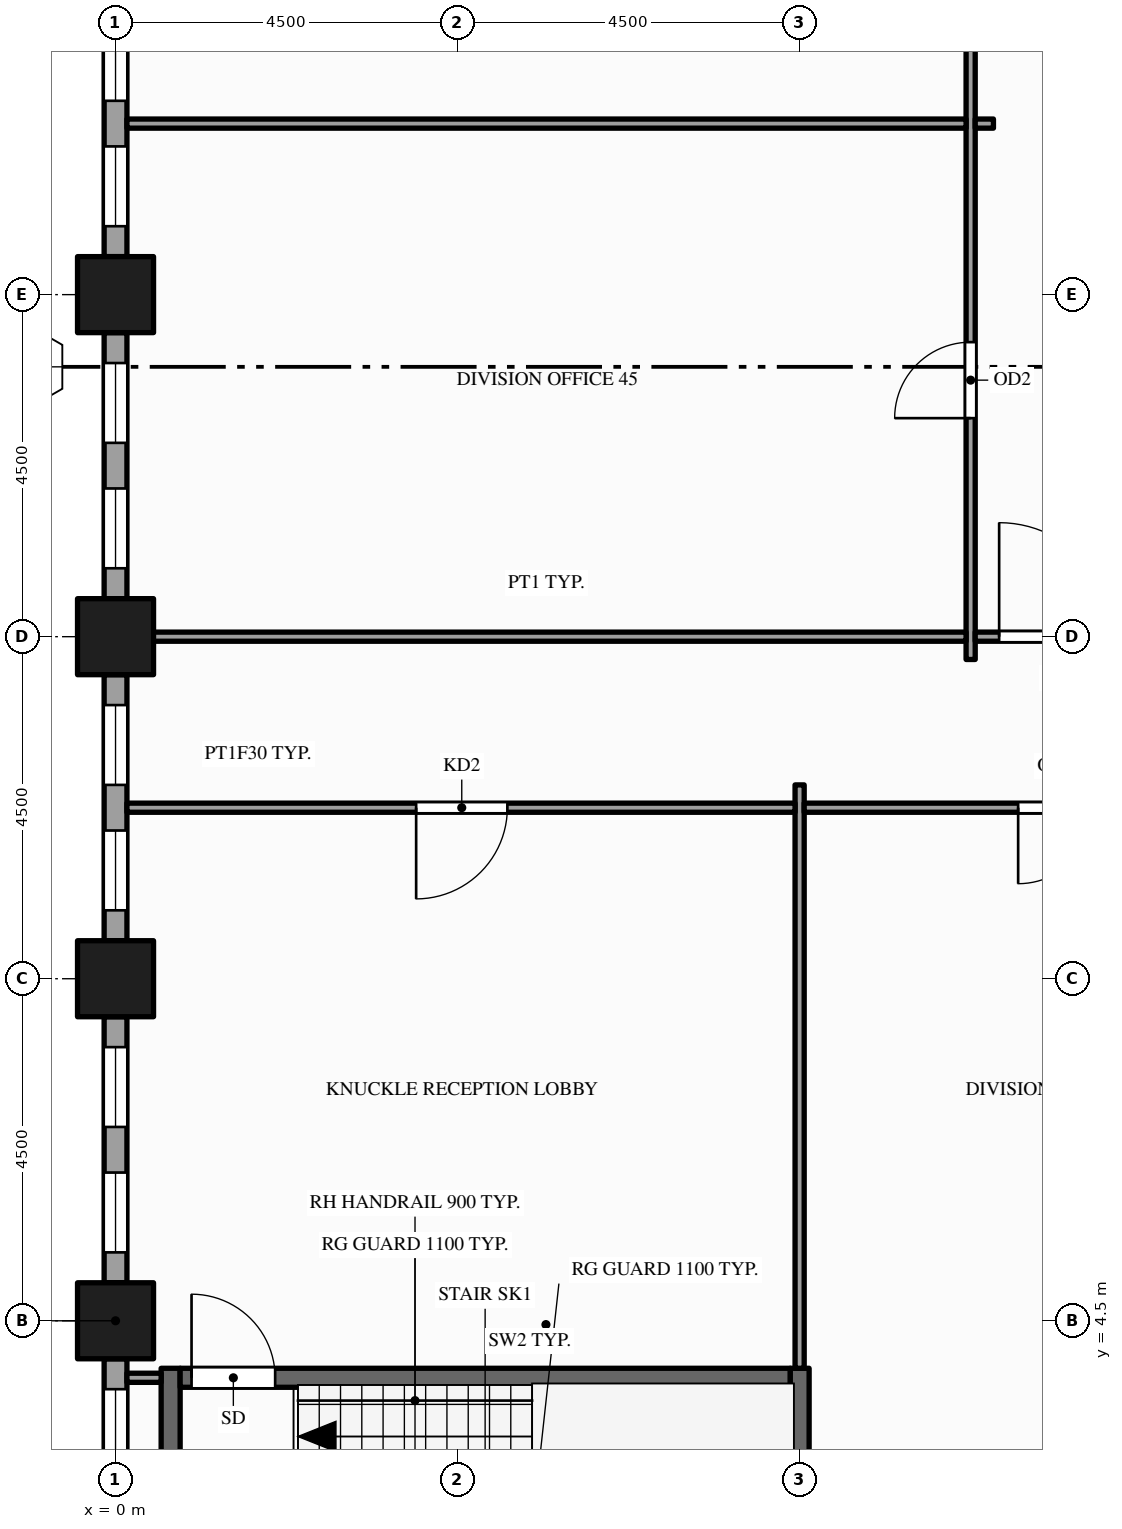
"""IFC4 building model, lengths in metres.
Left out: names, types, materials, properties, quantities, classifications, styles, units other than length and angle.
Written with IfcOpenShell. Run it as: python <this file> out.ifc"""

import sys

from ifc_helpers import new_model, si_unit, direction, frame, frame_2d, origin, origin_2d, place, context, subcontext, project, spatial, rectangle, hollow_rectangle, extrude, element, fill, save


model = new_model("IFC4")
c1 = context("Model", 3, precision=1e-05, world=origin(), true_north=direction((0.0, 1.0)))
c2 = subcontext(c1, "Body", "Model", "MODEL_VIEW")
j1 = project(units=[si_unit("LENGTHUNIT", "METRE"), si_unit("PLANEANGLEUNIT", "RADIAN")], contexts=[c1])
p1 = place(None, origin())
s1 = spatial("IfcSite", under=j1, at=p1, CompositionType="ELEMENT")
p2 = place(p1, origin())
s2 = spatial("IfcBuilding", under=s1, at=p2, CompositionType="ELEMENT")
p3 = place(p2, frame((0.0, 0.0, 83.0)))
s3 = spatial("IfcBuildingStorey", under=s2, at=p3, CompositionType="ELEMENT", Elevation=83.0)
for number, where, z_axis, x_axis in (
    (1, (0.0, 4.5, -0.15), (0.0, 0.0, 1.0), (1.0, 0.0, 0.0)),
    (2, (0.0, 9.0, -0.15), (0.0, 0.0, 1.0), (1.0, 0.0, 0.0)),
    (3, (0.0, 13.5, -0.15), (0.0, 0.0, 1.0), (1.0, 0.0, 0.0)),
    (4, (0.0, 18.0, -0.15), (0.0, 0.0, 1.0), (1.0, 0.0, 0.0)),
):
    element("IfcColumn", number, at=place(p3, frame(where, z_axis=z_axis, x_axis=x_axis)), inside=s3, PredefinedType="COLUMN", context=c2, shape_type="SweptSolid", body=[
        extrude(hollow_rectangle(XDim=1.0, YDim=1.0, WallThickness=0.05, at=origin_2d()), origin(), (0.0, 0.0, 1.0), 4.0),
    ])
p4 = place(p3, frame((0.0, 22.0, 0.0), z_axis=(0.0, 0.0, 1.0), x_axis=(0.0, -1.0, 0.0)))
e5 = element("IfcWall", 5, at=p4, inside=s3, PredefinedType="STANDARD", context=c2, shape_type="SweptSolid", body=[
    extrude(rectangle(XDim=3.5, YDim=0.3, at=frame_2d((1.75, 0.0))), origin(), (0.0, 0.0, 1.0), 3.154),
])
p5 = place(p4, frame((0.4, 0.0, 0.9)))
e6 = element("IfcOpeningElement", 6, at=p5, cuts=e5, PredefinedType="OPENING", context=c2, shape_type="SweptSolid", body=[
    extrude(rectangle(XDim=1.05, YDim=2.0, at=frame_2d((0.525, 1.0))), frame((0.0, 0.16, 0.0), z_axis=(0.0, -1.0, 0.0), x_axis=(1.0, 0.0, 0.0)), (0.0, 0.0, 1.0), 0.32),
])
p6 = place(p4, frame((2.05, 0.0, 0.9)))
e7 = element("IfcOpeningElement", 7, at=p6, cuts=e5, PredefinedType="OPENING", context=c2, shape_type="SweptSolid", body=[
    extrude(rectangle(XDim=1.05, YDim=2.0, at=frame_2d((0.525, 1.0))), frame((0.0, 0.16, 0.0), z_axis=(0.0, -1.0, 0.0), x_axis=(1.0, 0.0, 0.0)), (0.0, 0.0, 1.0), 0.32),
])
p7 = place(p3, frame((0.0, 17.5, 0.0), z_axis=(0.0, 0.0, 1.0), x_axis=(0.0, -1.0, 0.0)))
e8 = element("IfcWall", 8, at=p7, inside=s3, PredefinedType="STANDARD", context=c2, shape_type="SweptSolid", body=[
    extrude(rectangle(XDim=3.5, YDim=0.3, at=frame_2d((1.75, 0.0))), origin(), (0.0, 0.0, 1.0), 3.154),
])
p8 = place(p7, frame((0.4, 0.0, 0.9)))
e9 = element("IfcOpeningElement", 9, at=p8, cuts=e8, PredefinedType="OPENING", context=c2, shape_type="SweptSolid", body=[
    extrude(rectangle(XDim=1.05, YDim=2.0, at=frame_2d((0.525, 1.0))), frame((0.0, 0.16, 0.0), z_axis=(0.0, -1.0, 0.0), x_axis=(1.0, 0.0, 0.0)), (0.0, 0.0, 1.0), 0.32),
])
p9 = place(p7, frame((2.05, 0.0, 0.9)))
e10 = element("IfcOpeningElement", 10, at=p9, cuts=e8, PredefinedType="OPENING", context=c2, shape_type="SweptSolid", body=[
    extrude(rectangle(XDim=1.05, YDim=2.0, at=frame_2d((0.525, 1.0))), frame((0.0, 0.16, 0.0), z_axis=(0.0, -1.0, 0.0), x_axis=(1.0, 0.0, 0.0)), (0.0, 0.0, 1.0), 0.32),
])
p10 = place(p3, frame((0.0, 13.0, 0.0), z_axis=(0.0, 0.0, 1.0), x_axis=(0.0, -1.0, 0.0)))
e11 = element("IfcWall", 11, at=p10, inside=s3, PredefinedType="STANDARD", context=c2, shape_type="SweptSolid", body=[
    extrude(rectangle(XDim=3.5, YDim=0.3, at=frame_2d((1.75, 0.0))), origin(), (0.0, 0.0, 1.0), 3.154),
])
p11 = place(p10, frame((0.4, 0.0, 0.9)))
e12 = element("IfcOpeningElement", 12, at=p11, cuts=e11, PredefinedType="OPENING", context=c2, shape_type="SweptSolid", body=[
    extrude(rectangle(XDim=1.05, YDim=2.0, at=frame_2d((0.525, 1.0))), frame((0.0, 0.16, 0.0), z_axis=(0.0, -1.0, 0.0), x_axis=(1.0, 0.0, 0.0)), (0.0, 0.0, 1.0), 0.32),
])
p12 = place(p10, frame((2.05, 0.0, 0.9)))
e13 = element("IfcOpeningElement", 13, at=p12, cuts=e11, PredefinedType="OPENING", context=c2, shape_type="SweptSolid", body=[
    extrude(rectangle(XDim=1.05, YDim=2.0, at=frame_2d((0.525, 1.0))), frame((0.0, 0.16, 0.0), z_axis=(0.0, -1.0, 0.0), x_axis=(1.0, 0.0, 0.0)), (0.0, 0.0, 1.0), 0.32),
])
p13 = place(p3, frame((0.0, 8.5, 0.0), z_axis=(0.0, 0.0, 1.0), x_axis=(0.0, -1.0, 0.0)))
e14 = element("IfcWall", 14, at=p13, inside=s3, PredefinedType="STANDARD", context=c2, shape_type="SweptSolid", body=[
    extrude(rectangle(XDim=3.5, YDim=0.3, at=frame_2d((1.75, 0.0))), origin(), (0.0, 0.0, 1.0), 3.154),
])
p14 = place(p13, frame((0.4, 0.0, 0.9)))
e15 = element("IfcOpeningElement", 15, at=p14, cuts=e14, PredefinedType="OPENING", context=c2, shape_type="SweptSolid", body=[
    extrude(rectangle(XDim=1.05, YDim=2.0, at=frame_2d((0.525, 1.0))), frame((0.0, 0.16, 0.0), z_axis=(0.0, -1.0, 0.0), x_axis=(1.0, 0.0, 0.0)), (0.0, 0.0, 1.0), 0.32),
])
p15 = place(p13, frame((2.05, 0.0, 0.9)))
e16 = element("IfcOpeningElement", 16, at=p15, cuts=e14, PredefinedType="OPENING", context=c2, shape_type="SweptSolid", body=[
    extrude(rectangle(XDim=1.05, YDim=2.0, at=frame_2d((0.525, 1.0))), frame((0.0, 0.16, 0.0), z_axis=(0.0, -1.0, 0.0), x_axis=(1.0, 0.0, 0.0)), (0.0, 0.0, 1.0), 0.32),
])
p16 = place(p3, frame((0.0, 4.0, 0.0), z_axis=(0.0, 0.0, 1.0), x_axis=(0.0, -1.0, 0.0)))
e17 = element("IfcWall", 17, at=p16, inside=s3, PredefinedType="STANDARD", context=c2, shape_type="SweptSolid", body=[
    extrude(rectangle(XDim=3.5, YDim=0.3, at=frame_2d((1.75, 0.0))), origin(), (0.0, 0.0, 1.0), 3.154),
])
p17 = place(p16, frame((0.4, 0.0, 0.9)))
e18 = element("IfcOpeningElement", 18, at=p17, cuts=e17, PredefinedType="OPENING", context=c2, shape_type="SweptSolid", body=[
    extrude(rectangle(XDim=1.05, YDim=2.0, at=frame_2d((0.525, 1.0))), frame((0.0, 0.16, 0.0), z_axis=(0.0, -1.0, 0.0), x_axis=(1.0, 0.0, 0.0)), (0.0, 0.0, 1.0), 0.32),
])
p18 = place(p16, frame((2.05, 0.0, 0.9)))
e19 = element("IfcOpeningElement", 19, at=p18, cuts=e17, PredefinedType="OPENING", context=c2, shape_type="SweptSolid", body=[
    extrude(rectangle(XDim=1.05, YDim=2.0, at=frame_2d((0.525, 1.0))), frame((0.0, 0.16, 0.0), z_axis=(0.0, -1.0, 0.0), x_axis=(1.0, 0.0, 0.0)), (0.0, 0.0, 1.0), 0.32),
])
p19 = place(p3, frame((0.725, 0.6, 0.0), z_axis=(0.0, 0.0, 1.0), x_axis=(0.0, 1.0, 0.0)))
e20 = element("IfcWall", 20, at=p19, inside=s3, PredefinedType="SHEAR", context=c2, shape_type="SweptSolid", body=[
    extrude(rectangle(XDim=3.275, YDim=0.25, at=frame_2d((1.637, 0.0))), origin(), (0.0, 0.0, 1.0), 3.85),
])
p20 = place(p3, frame((9.0, 0.5, 0.0), z_axis=(0.0, 0.0, 1.0), x_axis=(0.0, 1.0, 0.0)))
e21 = element("IfcWall", 21, at=p20, inside=s3, PredefinedType="SHEAR", context=c2, shape_type="SweptSolid", body=[
    extrude(rectangle(XDim=3.375, YDim=0.25, at=frame_2d((1.688, 0.0))), origin(), (0.0, 0.0, 1.0), 3.85),
])
p21 = place(p3, frame((9.0, 3.875, 0.0), z_axis=(0.0, 0.0, 1.0), x_axis=(0.0, 1.0, 0.0)))
e22 = element("IfcWall", 22, at=p21, inside=s3, PredefinedType="PARTITIONING", context=c2, shape_type="SweptSolid", body=[
    extrude(rectangle(XDim=7.675, YDim=0.12, at=frame_2d((3.837, 0.0))), origin(), (0.0, 0.0, 1.0), 2.938),
])
p22 = place(p3, frame((11.25, 13.2, 0.0), z_axis=(0.0, 0.0, 1.0), x_axis=(0.0, 1.0, 0.0)))
e23 = element("IfcWall", 23, at=p22, inside=s3, PredefinedType="PARTITIONING", context=c2, shape_type="SweptSolid", body=[
    extrude(rectangle(XDim=18.6, YDim=0.12, at=frame_2d((9.3, 0.0))), origin(), (0.0, 0.0, 1.0), 2.6),
])
p23 = place(p22, frame((3.175, 0.0, 0.0)))
e24 = element("IfcOpeningElement", 24, at=p23, cuts=e23, PredefinedType="OPENING", context=c2, shape_type="SweptSolid", body=[
    extrude(rectangle(XDim=1.0, YDim=2.1, at=frame_2d((0.5, 1.05))), frame((0.0, 0.07, 0.0), z_axis=(0.0, -1.0, 0.0), x_axis=(1.0, 0.0, 0.0)), (0.0, 0.0, 1.0), 0.14),
])
p24 = place(p22, frame((9.855, 0.0, 0.0)))
e25 = element("IfcOpeningElement", 25, at=p24, cuts=e23, PredefinedType="OPENING", context=c2, shape_type="SweptSolid", body=[
    extrude(rectangle(XDim=1.2, YDim=2.1, at=frame_2d((0.6, 1.05))), frame((0.0, 0.07, 0.0), z_axis=(0.0, -1.0, 0.0), x_axis=(1.0, 0.0, 0.0)), (0.0, 0.0, 1.0), 0.14),
])
p25 = place(p3, frame((0.15, 3.75, 0.0), z_axis=(0.0, 0.0, 1.0), x_axis=(1.0, 0.0, 0.0)))
e26 = element("IfcWall", 26, at=p25, inside=s3, PredefinedType="PARTITIONING", context=c2, shape_type="SweptSolid", body=[
    extrude(rectangle(XDim=0.45, YDim=0.12, at=frame_2d((0.225, 0.0))), origin(), (0.0, 0.0, 1.0), 3.154),
])
p26 = place(p3, frame((0.85, 3.75, 0.0), z_axis=(0.0, 0.0, 1.0), x_axis=(1.0, 0.0, 0.0)))
e27 = element("IfcWall", 27, at=p26, inside=s3, PredefinedType="SHEAR", context=c2, shape_type="SweptSolid", body=[
    extrude(rectangle(XDim=8.025, YDim=0.25, at=frame_2d((4.012, 0.0))), origin(), (0.0, 0.0, 1.0), 3.85),
])
p27 = place(p26, frame((0.15, 0.0, 0.0)))
e28 = element("IfcOpeningElement", 28, at=p27, cuts=e27, PredefinedType="OPENING", context=c2, shape_type="SweptSolid", body=[
    extrude(rectangle(XDim=1.1, YDim=2.1, at=frame_2d((0.55, 1.05))), frame((0.0, 0.135, 0.0), z_axis=(0.0, -1.0, 0.0), x_axis=(1.0, 0.0, 0.0)), (0.0, 0.0, 1.0), 0.27),
])
p28 = place(p3, frame((0.15, 11.25, 0.0), z_axis=(0.0, 0.0, 1.0), x_axis=(1.0, 0.0, 0.0)))
e29 = element("IfcWall", 29, at=p28, inside=s3, PredefinedType="PARTITIONING", context=c2, shape_type="SweptSolid", body=[
    extrude(rectangle(XDim=8.79, YDim=0.12, at=frame_2d((4.395, 0.0))), origin(), (0.0, 0.0, 1.0), 2.938),
])
p29 = place(p28, frame((3.805, 0.0, 0.0)))
e30 = element("IfcOpeningElement", 30, at=p29, cuts=e29, PredefinedType="OPENING", context=c2, shape_type="SweptSolid", body=[
    extrude(rectangle(XDim=1.2, YDim=2.1, at=frame_2d((0.6, 1.05))), frame((0.0, 0.07, 0.0), z_axis=(0.0, -1.0, 0.0), x_axis=(1.0, 0.0, 0.0)), (0.0, 0.0, 1.0), 0.14),
])
p30 = place(p3, frame((9.06, 11.25, 0.0), z_axis=(0.0, 0.0, 1.0), x_axis=(1.0, 0.0, 0.0)))
e31 = element("IfcWall", 31, at=p30, inside=s3, PredefinedType="PARTITIONING", context=c2, shape_type="SweptSolid", body=[
    extrude(rectangle(XDim=6.63, YDim=0.12, at=frame_2d((3.315, 0.0))), origin(), (0.0, 0.0, 1.0), 2.938),
])
p31 = place(p30, frame((2.815, 0.0, 0.0)))
e32 = element("IfcOpeningElement", 32, at=p31, cuts=e31, PredefinedType="OPENING", context=c2, shape_type="SweptSolid", body=[
    extrude(rectangle(XDim=1.0, YDim=2.1, at=frame_2d((0.5, 1.05))), frame((0.0, 0.07, 0.0), z_axis=(0.0, -1.0, 0.0), x_axis=(1.0, 0.0, 0.0)), (0.0, 0.0, 1.0), 0.14),
])
p32 = place(p3, frame((0.15, 13.5, 0.0), z_axis=(0.0, 0.0, 1.0), x_axis=(1.0, 0.0, 0.0)))
e33 = element("IfcWall", 33, at=p32, inside=s3, PredefinedType="PARTITIONING", context=c2, shape_type="SweptSolid", body=[
    extrude(rectangle(XDim=11.04, YDim=0.12, at=frame_2d((5.52, 0.0))), origin(), (0.0, 0.0, 1.0), 2.938),
])
p33 = place(p3, frame((11.31, 13.5, 0.0), z_axis=(0.0, 0.0, 1.0), x_axis=(1.0, 0.0, 0.0)))
e34 = element("IfcWall", 34, at=p33, inside=s3, PredefinedType="PARTITIONING", context=c2, shape_type="SweptSolid", body=[
    extrude(rectangle(XDim=2.13, YDim=0.12, at=frame_2d((1.065, 0.0))), origin(), (0.0, 0.0, 1.0), 2.938),
])
p34 = place(p33, frame((0.315, 0.0, 0.0)))
e35 = element("IfcOpeningElement", 35, at=p34, cuts=e34, PredefinedType="OPENING", context=c2, shape_type="SweptSolid", body=[
    extrude(rectangle(XDim=1.5, YDim=2.1, at=frame_2d((0.75, 1.05))), frame((0.0, 0.07, 0.0), z_axis=(0.0, -1.0, 0.0), x_axis=(1.0, 0.0, 0.0)), (0.0, 0.0, 1.0), 0.14),
])
p35 = place(p3, frame((0.15, 20.25, 0.0), z_axis=(0.0, 0.0, 1.0), x_axis=(1.0, 0.0, 0.0)))
e36 = element("IfcWall", 36, at=p35, inside=s3, PredefinedType="PARTITIONING", context=c2, shape_type="SweptSolid", body=[
    extrude(rectangle(XDim=11.04, YDim=0.12, at=frame_2d((5.52, 0.0))), origin(), (0.0, 0.0, 1.0), 2.938),
])
p36 = place(p3, frame((11.31, 20.25, 0.0), z_axis=(0.0, 0.0, 1.0), x_axis=(1.0, 0.0, 0.0)))
e37 = element("IfcWall", 37, at=p36, inside=s3, PredefinedType="PARTITIONING", context=c2, shape_type="SweptSolid", body=[
    extrude(rectangle(XDim=0.24, YDim=0.12, at=frame_2d((0.12, 0.0))), origin(), (0.0, 0.0, 1.0), 2.938),
])
p37 = place(p5, origin())
e38 = element("IfcWindow", 38, at=p37, inside=s3, PartitioningType="SINGLE_PANEL", PredefinedType="WINDOW", context=c2, shape_type="SweptSolid", body=[
    extrude(rectangle(XDim=1.05, YDim=2.0, at=frame_2d((0.525, 1.0))), frame((0.0, 0.03, 0.0), z_axis=(0.0, -1.0, 0.0), x_axis=(1.0, 0.0, 0.0)), (0.0, 0.0, 1.0), 0.06),
])
fill(e6, e38)
p38 = place(p6, origin())
e39 = element("IfcWindow", 39, at=p38, inside=s3, PartitioningType="SINGLE_PANEL", PredefinedType="WINDOW", context=c2, shape_type="SweptSolid", body=[
    extrude(rectangle(XDim=1.05, YDim=2.0, at=frame_2d((0.525, 1.0))), frame((0.0, 0.03, 0.0), z_axis=(0.0, -1.0, 0.0), x_axis=(1.0, 0.0, 0.0)), (0.0, 0.0, 1.0), 0.06),
])
fill(e7, e39)
p39 = place(p8, origin())
e40 = element("IfcWindow", 40, at=p39, inside=s3, PartitioningType="SINGLE_PANEL", PredefinedType="WINDOW", context=c2, shape_type="SweptSolid", body=[
    extrude(rectangle(XDim=1.05, YDim=2.0, at=frame_2d((0.525, 1.0))), frame((0.0, 0.03, 0.0), z_axis=(0.0, -1.0, 0.0), x_axis=(1.0, 0.0, 0.0)), (0.0, 0.0, 1.0), 0.06),
])
fill(e9, e40)
p40 = place(p9, origin())
e41 = element("IfcWindow", 41, at=p40, inside=s3, PartitioningType="SINGLE_PANEL", PredefinedType="WINDOW", context=c2, shape_type="SweptSolid", body=[
    extrude(rectangle(XDim=1.05, YDim=2.0, at=frame_2d((0.525, 1.0))), frame((0.0, 0.03, 0.0), z_axis=(0.0, -1.0, 0.0), x_axis=(1.0, 0.0, 0.0)), (0.0, 0.0, 1.0), 0.06),
])
fill(e10, e41)
p41 = place(p11, origin())
e42 = element("IfcWindow", 42, at=p41, inside=s3, PartitioningType="SINGLE_PANEL", PredefinedType="WINDOW", context=c2, shape_type="SweptSolid", body=[
    extrude(rectangle(XDim=1.05, YDim=2.0, at=frame_2d((0.525, 1.0))), frame((0.0, 0.03, 0.0), z_axis=(0.0, -1.0, 0.0), x_axis=(1.0, 0.0, 0.0)), (0.0, 0.0, 1.0), 0.06),
])
fill(e12, e42)
p42 = place(p12, origin())
e43 = element("IfcWindow", 43, at=p42, inside=s3, PartitioningType="SINGLE_PANEL", PredefinedType="WINDOW", context=c2, shape_type="SweptSolid", body=[
    extrude(rectangle(XDim=1.05, YDim=2.0, at=frame_2d((0.525, 1.0))), frame((0.0, 0.03, 0.0), z_axis=(0.0, -1.0, 0.0), x_axis=(1.0, 0.0, 0.0)), (0.0, 0.0, 1.0), 0.06),
])
fill(e13, e43)
p43 = place(p14, origin())
e44 = element("IfcWindow", 44, at=p43, inside=s3, PartitioningType="SINGLE_PANEL", PredefinedType="WINDOW", context=c2, shape_type="SweptSolid", body=[
    extrude(rectangle(XDim=1.05, YDim=2.0, at=frame_2d((0.525, 1.0))), frame((0.0, 0.03, 0.0), z_axis=(0.0, -1.0, 0.0), x_axis=(1.0, 0.0, 0.0)), (0.0, 0.0, 1.0), 0.06),
])
fill(e15, e44)
p44 = place(p15, origin())
e45 = element("IfcWindow", 45, at=p44, inside=s3, PartitioningType="SINGLE_PANEL", PredefinedType="WINDOW", context=c2, shape_type="SweptSolid", body=[
    extrude(rectangle(XDim=1.05, YDim=2.0, at=frame_2d((0.525, 1.0))), frame((0.0, 0.03, 0.0), z_axis=(0.0, -1.0, 0.0), x_axis=(1.0, 0.0, 0.0)), (0.0, 0.0, 1.0), 0.06),
])
fill(e16, e45)
p45 = place(p17, origin())
e46 = element("IfcWindow", 46, at=p45, inside=s3, PartitioningType="SINGLE_PANEL", PredefinedType="WINDOW", context=c2, shape_type="SweptSolid", body=[
    extrude(rectangle(XDim=1.05, YDim=2.0, at=frame_2d((0.525, 1.0))), frame((0.0, 0.03, 0.0), z_axis=(0.0, -1.0, 0.0), x_axis=(1.0, 0.0, 0.0)), (0.0, 0.0, 1.0), 0.06),
])
fill(e18, e46)
p46 = place(p27, origin())
e47 = element("IfcDoor", 47, at=p46, inside=s3, OperationType="SINGLE_SWING_LEFT", PredefinedType="DOOR", context=c2, shape_type="SweptSolid", body=[
    extrude(rectangle(XDim=1.1, YDim=2.1, at=frame_2d((0.55, 1.05))), frame((0.0, 0.025, 0.0), z_axis=(0.0, -1.0, 0.0), x_axis=(1.0, 0.0, 0.0)), (0.0, 0.0, 1.0), 0.05),
])
fill(e28, e47)
p47 = place(p29, origin())
e48 = element("IfcDoor", 48, at=p47, inside=s3, OperationType="SINGLE_SWING_LEFT", PredefinedType="DOOR", context=c2, shape_type="SweptSolid", body=[
    extrude(rectangle(XDim=1.2, YDim=2.1, at=frame_2d((0.6, 1.05))), frame((0.0, 0.025, 0.0), z_axis=(0.0, -1.0, 0.0), x_axis=(1.0, 0.0, 0.0)), (0.0, 0.0, 1.0), 0.05),
])
fill(e30, e48)
p48 = place(p31, origin())
e49 = element("IfcDoor", 49, at=p48, inside=s3, OperationType="SINGLE_SWING_LEFT", PredefinedType="DOOR", context=c2, shape_type="SweptSolid", body=[
    extrude(rectangle(XDim=1.0, YDim=2.1, at=frame_2d((0.5, 1.05))), frame((0.0, 0.025, 0.0), z_axis=(0.0, -1.0, 0.0), x_axis=(1.0, 0.0, 0.0)), (0.0, 0.0, 1.0), 0.05),
])
fill(e32, e49)
p49 = place(p34, origin())
e50 = element("IfcDoor", 50, at=p49, inside=s3, OperationType="SINGLE_SWING_LEFT", PredefinedType="DOOR", context=c2, shape_type="SweptSolid", body=[
    extrude(rectangle(XDim=1.5, YDim=2.1, at=frame_2d((0.75, 1.05))), frame((0.0, 0.025, 0.0), z_axis=(0.0, -1.0, 0.0), x_axis=(1.0, 0.0, 0.0)), (0.0, 0.0, 1.0), 0.05),
])
fill(e35, e50)
p50 = place(p23, origin())
e51 = element("IfcDoor", 51, at=p50, inside=s3, OperationType="SINGLE_SWING_LEFT", PredefinedType="DOOR", context=c2, shape_type="SweptSolid", body=[
    extrude(rectangle(XDim=1.0, YDim=2.1, at=frame_2d((0.5, 1.05))), frame((0.0, 0.025, 0.0), z_axis=(0.0, -1.0, 0.0), x_axis=(1.0, 0.0, 0.0)), (0.0, 0.0, 1.0), 0.05),
])
fill(e24, e51)
save(model, sys.argv[1])
